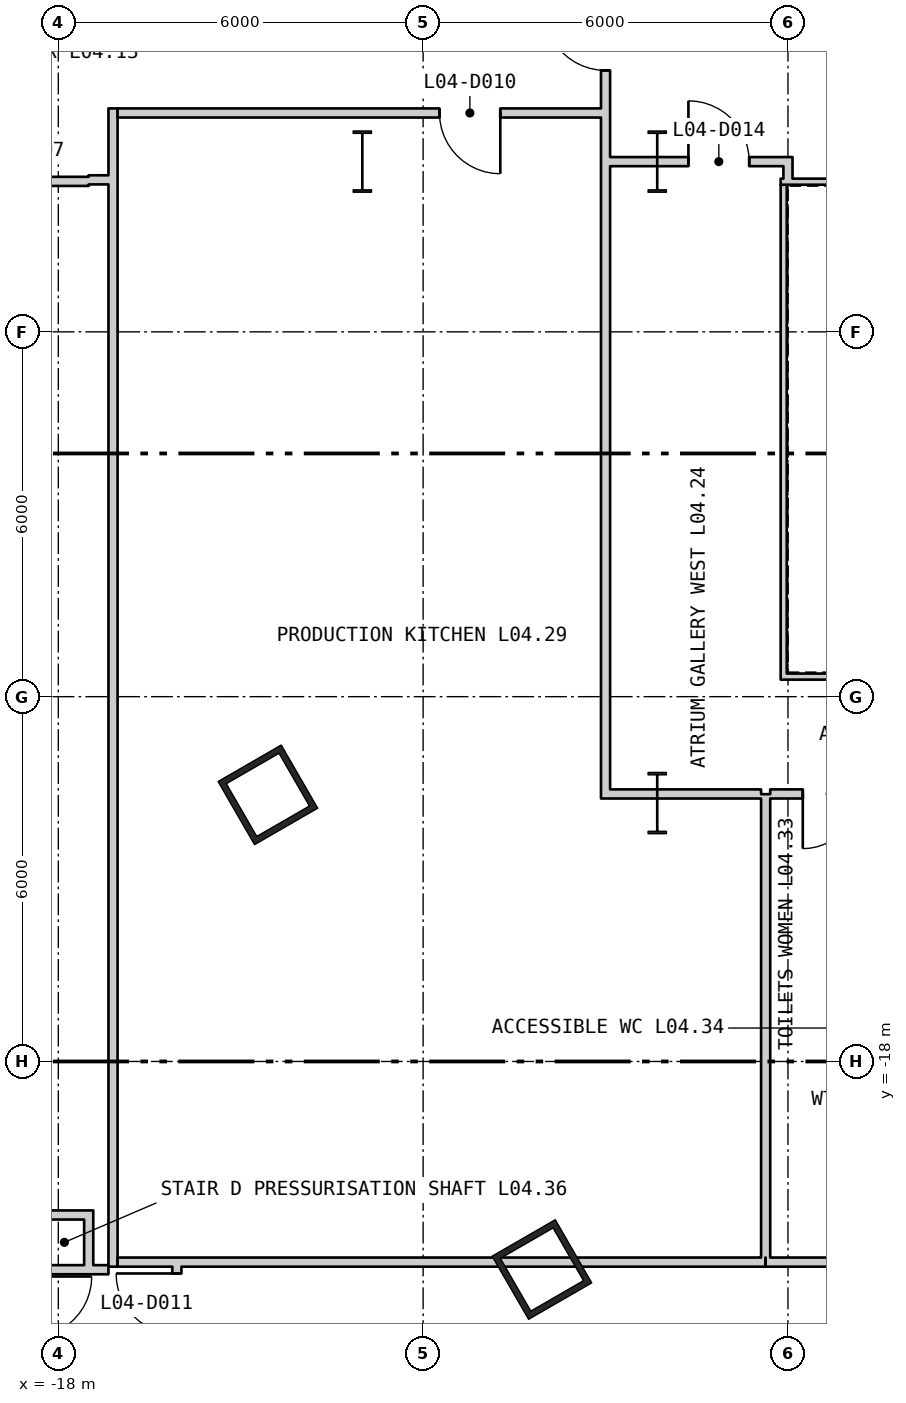
"""IFC4 building model, lengths in metres.
Left out: names, types, materials, properties, quantities, classifications, styles, units other than length and angle.
Written with IfcOpenShell. Run it as: python <this file> out.ifc"""

import sys

from ifc_helpers import new_model, si_unit, direction, frame, frame_2d, origin, origin_2d, place, context, subcontext, project, spatial, rectangle, hollow_rectangle, i_section, extrude, element, fill, save


model = new_model("IFC4")
c1 = context("Model", 3, precision=1e-05, world=origin(), true_north=direction((0.0, 1.0)))
c2 = subcontext(c1, "Body", "Model", "MODEL_VIEW")
j1 = project(units=[si_unit("LENGTHUNIT", "METRE"), si_unit("PLANEANGLEUNIT", "RADIAN")], contexts=[c1])
p1 = place(None, origin())
s1 = spatial("IfcSite", under=j1, at=p1, CompositionType="ELEMENT")
p2 = place(p1, origin())
s2 = spatial("IfcBuilding", under=s1, at=p2, CompositionType="ELEMENT")
p3 = place(p2, frame((0.0, 0.0, 23.7)))
s3 = spatial("IfcBuildingStorey", under=s2, at=p3, CompositionType="ELEMENT", Elevation=23.7)
for number, where, z_axis, x_axis in (
    (1, (-14.553, -13.615, 0.0), (0.0, 0.0, 1.0), (0.5, -0.866, 0.0)),
    (2, (-10.046, -21.422, 0.0), (0.0, 0.0, 1.0), (0.5, -0.866, 0.0)),
):
    element("IfcColumn", number, at=place(p3, frame(where, z_axis=z_axis, x_axis=x_axis)), inside=s3, PredefinedType="COLUMN", context=c2, shape_type="SweptSolid", body=[
        extrude(hollow_rectangle(XDim=1.2, YDim=1.2, WallThickness=0.1, at=origin_2d()), origin(), (0.0, 0.0, 1.0), 5.1),
    ])
for number, where, z_axis, x_axis in (
    (3, (-8.15, -3.2, 0.0), (0.0, 0.0, 1.0), (1.0, 0.0, 0.0)),
    (4, (-8.15, -13.75, 0.0), (0.0, 0.0, 1.0), (1.0, 0.0, 0.0)),
    (5, (-13.0, -3.2, 0.0), (0.0, 0.0, 1.0), (1.0, 0.0, 0.0)),
):
    element("IfcColumn", number, at=place(p3, frame(where, z_axis=z_axis, x_axis=x_axis)), inside=s3, PredefinedType="COLUMN", context=c2, shape_type="SweptSolid", body=[
        extrude(i_section(OverallWidth=0.302, OverallDepth=1.008, WebThickness=0.021, FlangeThickness=0.04, at=origin_2d()), origin(), (0.0, 0.0, 1.0), 5.1),
    ])
for number, where, z_axis, x_axis in (
    (6, (-6.12, -11.67, 0.0), (0.0, 0.0, 1.0), (1.0, 0.0, 0.0)),
    (7, (6.12, -3.53, 0.0), (0.0, 0.0, 1.0), (-1.0, 0.0, 0.0)),
):
    element("IfcWall", number, at=place(p3, frame(where, z_axis=z_axis, x_axis=x_axis)), inside=s3, PredefinedType="PARTITIONING", context=c2, shape_type="SweptSolid", body=[
        extrude(rectangle(XDim=12.24, YDim=0.1, at=frame_2d((6.12, 0.0))), origin(), (0.0, 0.0, 1.0), 4.85),
    ])
p4 = place(p3, frame((-6.07, -3.58, 0.0), z_axis=(0.0, 0.0, 1.0), x_axis=(0.0, -1.0, 0.0)))
e8 = element("IfcWall", 8, at=p4, inside=s3, PredefinedType="PARTITIONING", context=c2, shape_type="SweptSolid", body=[
    extrude(rectangle(XDim=8.04, YDim=0.1, at=frame_2d((4.02, 0.0))), origin(), (0.0, 0.0, 1.0), 4.85),
])
p5 = place(p3, frame((-19.825, -3.525, 0.0), z_axis=(0.0, 0.0, 1.0), x_axis=(1.0, 0.0, 0.0)))
e9 = element("IfcWall", 9, at=p5, inside=s3, PredefinedType="PARTITIONING", context=c2, shape_type="SweptSolid", body=[
    extrude(rectangle(XDim=2.325, YDim=0.15, at=frame_2d((1.163, 0.0))), origin(), (0.0, 0.0, 1.0), 4.85),
])
p6 = place(p5, frame((0.662, 0.0, 0.0)))
e10 = element("IfcOpeningElement", 10, at=p6, cuts=e9, PredefinedType="OPENING", context=c2, shape_type="SweptSolid", body=[
    extrude(rectangle(XDim=1.0, YDim=2.1, at=frame_2d((0.5, 1.05))), frame((0.0, 0.085, 0.0), z_axis=(0.0, -1.0, 0.0), x_axis=(1.0, 0.0, 0.0)), (0.0, 0.0, 1.0), 0.17),
])
for number, where, z_axis, x_axis in (
    (11, (-18.225, -21.425, 0.0), (0.0, 0.0, 1.0), (1.0, 0.0, 0.0)),
    (12, (-18.225, -20.525, 0.0), (0.0, 0.0, 1.0), (1.0, 0.0, 0.0)),
):
    element("IfcWall", number, at=place(p3, frame(where, z_axis=z_axis, x_axis=x_axis)), inside=s3, PredefinedType="PARTITIONING", context=c2, shape_type="SweptSolid", body=[
        extrude(rectangle(XDim=0.65, YDim=0.15, at=frame_2d((0.325, 0.0))), origin(), (0.0, 0.0, 1.0), 4.85),
    ])
p7 = place(p3, frame((-17.5, -21.5, 0.0), z_axis=(0.0, 0.0, 1.0), x_axis=(0.0, 1.0, 0.0)))
e13 = element("IfcWall", 13, at=p7, inside=s3, PredefinedType="PARTITIONING", context=c2, shape_type="SweptSolid", body=[
    extrude(rectangle(XDim=1.05, YDim=0.15, at=frame_2d((0.525, 0.0))), origin(), (0.0, 0.0, 1.0), 4.85),
])
p8 = place(p3, frame((-17.5, -3.5, 0.0), z_axis=(0.0, 0.0, 1.0), x_axis=(1.0, 0.0, 0.0)))
e14 = element("IfcWall", 14, at=p8, inside=s3, PredefinedType="PARTITIONING", context=c2, shape_type="SweptSolid", body=[
    extrude(rectangle(XDim=0.325, YDim=0.15, at=frame_2d((0.163, 0.0))), origin(), (0.0, 0.0, 1.0), 4.85),
])
p9 = place(p3, frame((-17.425, -21.425, 0.0), z_axis=(0.0, 0.0, 1.0), x_axis=(1.0, 0.0, 0.0)))
e15 = element("IfcWall", 15, at=p9, inside=s3, PredefinedType="PARTITIONING", context=c2, shape_type="SweptSolid", body=[
    extrude(rectangle(XDim=0.25, YDim=0.15, at=frame_2d((0.125, 0.0))), origin(), (0.0, 0.0, 1.0), 4.85),
])
p10 = place(p3, frame((-17.1, -21.375, 0.0), z_axis=(0.0, 0.0, 1.0), x_axis=(0.0, 1.0, 0.0)))
e16 = element("IfcWall", 16, at=p10, inside=s3, PredefinedType="PARTITIONING", context=c2, shape_type="SweptSolid", body=[
    extrude(rectangle(XDim=19.05, YDim=0.15, at=frame_2d((9.525, 0.0))), origin(), (0.0, 0.0, 1.0), 4.85),
])
p11 = place(p3, frame((-17.025, -21.3, 0.0), z_axis=(0.0, 0.0, 1.0), x_axis=(1.0, 0.0, 0.0)))
e17 = element("IfcWall", 17, at=p11, inside=s3, PredefinedType="PARTITIONING", context=c2, shape_type="SweptSolid", body=[
    extrude(rectangle(XDim=10.654, YDim=0.15, at=frame_2d((5.327, 0.0))), origin(), (0.0, 0.0, 1.0), 4.85),
])
p12 = place(p3, frame((-17.025, -2.4, 0.0), z_axis=(0.0, 0.0, 1.0), x_axis=(1.0, 0.0, 0.0)))
e18 = element("IfcWall", 18, at=p12, inside=s3, PredefinedType="PARTITIONING", context=c2, shape_type="SweptSolid", body=[
    extrude(rectangle(XDim=7.95, YDim=0.15, at=frame_2d((3.975, 0.0))), origin(), (0.0, 0.0, 1.0), 4.85),
])
p13 = place(p12, frame((5.294, 0.0, 0.0)))
e19 = element("IfcOpeningElement", 19, at=p13, cuts=e18, PredefinedType="OPENING", context=c2, shape_type="SweptSolid", body=[
    extrude(rectangle(XDim=1.0, YDim=2.1, at=frame_2d((0.5, 1.05))), frame((0.0, 0.085, 0.0), z_axis=(0.0, -1.0, 0.0), x_axis=(1.0, 0.0, 0.0)), (0.0, 0.0, 1.0), 0.17),
])
p14 = place(p3, frame((-16.05, -23.55, 0.0), z_axis=(0.0, 0.0, 1.0), x_axis=(0.0, 1.0, 0.0)))
e20 = element("IfcWall", 20, at=p14, inside=s3, PredefinedType="PARTITIONING", context=c2, shape_type="SweptSolid", body=[
    extrude(rectangle(XDim=2.175, YDim=0.15, at=frame_2d((1.087, 0.0))), origin(), (0.0, 0.0, 1.0), 4.16),
])
p15 = place(p14, frame((1.063, 0.0, 0.0)))
e21 = element("IfcOpeningElement", 21, at=p15, cuts=e20, PredefinedType="OPENING", context=c2, shape_type="SweptSolid", body=[
    extrude(rectangle(XDim=1.0, YDim=2.1, at=frame_2d((0.5, 1.05))), frame((0.0, 0.085, 0.0), z_axis=(0.0, -1.0, 0.0), x_axis=(1.0, 0.0, 0.0)), (0.0, 0.0, 1.0), 0.17),
])
p16 = place(p3, frame((-9.0, -13.675, 0.0), z_axis=(0.0, 0.0, 1.0), x_axis=(0.0, 1.0, 0.0)))
e22 = element("IfcWall", 22, at=p16, inside=s3, PredefinedType="PARTITIONING", context=c2, shape_type="SweptSolid", body=[
    extrude(rectangle(XDim=13.675, YDim=0.15, at=frame_2d((6.838, 0.0))), origin(), (0.0, 0.0, 1.0), 4.85),
])
p17 = place(p16, frame((11.975, 0.0, 0.0)))
e23 = element("IfcOpeningElement", 23, at=p17, cuts=e22, PredefinedType="OPENING", context=c2, shape_type="SweptSolid", body=[
    extrude(rectangle(XDim=1.0, YDim=2.1, at=frame_2d((0.5, 1.05))), frame((0.0, 0.085, 0.0), z_axis=(0.0, -1.0, 0.0), x_axis=(1.0, 0.0, 0.0)), (0.0, 0.0, 1.0), 0.17),
])
p18 = place(p3, frame((-8.925, -13.6, 0.0), z_axis=(0.0, 0.0, 1.0), x_axis=(1.0, 0.0, 0.0)))
e24 = element("IfcWall", 24, at=p18, inside=s3, PredefinedType="PARTITIONING", context=c2, shape_type="SweptSolid", body=[
    extrude(rectangle(XDim=0.775, YDim=0.15, at=frame_2d((0.388, 0.0))), origin(), (0.0, 0.0, 1.0), 3.842),
])
p19 = place(p3, frame((-8.15, -13.6, 0.0), z_axis=(0.0, 0.0, 1.0), x_axis=(1.0, 0.0, 0.0)))
e25 = element("IfcWall", 25, at=p19, inside=s3, PredefinedType="PARTITIONING", context=c2, shape_type="SweptSolid", body=[
    extrude(rectangle(XDim=1.708, YDim=0.15, at=frame_2d((0.854, 0.0))), origin(), (0.0, 0.0, 1.0), 3.94),
])
p20 = place(p3, frame((-8.925, -3.2, 0.0), z_axis=(0.0, 0.0, 1.0), x_axis=(1.0, 0.0, 0.0)))
e26 = element("IfcWall", 26, at=p20, inside=s3, PredefinedType="PARTITIONING", context=c2, shape_type="SweptSolid", body=[
    extrude(rectangle(XDim=0.775, YDim=0.15, at=frame_2d((0.388, 0.0))), origin(), (0.0, 0.0, 1.0), 4.16),
])
p21 = place(p3, frame((-8.15, -3.2, 0.0), z_axis=(0.0, 0.0, 1.0), x_axis=(1.0, 0.0, 0.0)))
e27 = element("IfcWall", 27, at=p21, inside=s3, PredefinedType="PARTITIONING", context=c2, shape_type="SweptSolid", body=[
    extrude(rectangle(XDim=2.225, YDim=0.15, at=frame_2d((1.113, 0.0))), origin(), (0.0, 0.0, 1.0), 3.94),
])
p22 = place(p21, frame((0.513, 0.0, 0.0)))
e28 = element("IfcOpeningElement", 28, at=p22, cuts=e27, PredefinedType="OPENING", context=c2, shape_type="SweptSolid", body=[
    extrude(rectangle(XDim=1.0, YDim=2.1, at=frame_2d((0.5, 1.05))), frame((0.0, 0.085, 0.0), z_axis=(0.0, -1.0, 0.0), x_axis=(1.0, 0.0, 0.0)), (0.0, 0.0, 1.0), 0.17),
])
p23 = place(p3, frame((-6.367, -21.3, 0.0), z_axis=(0.0, 0.0, 1.0), x_axis=(1.0, 0.0, 0.0)))
e29 = element("IfcWall", 29, at=p23, inside=s3, PredefinedType="PARTITIONING", context=c2, shape_type="SweptSolid", body=[
    extrude(rectangle(XDim=4.667, YDim=0.15, at=frame_2d((2.333, 0.0))), origin(), (0.0, 0.0, 1.0), 4.85),
])
p24 = place(p3, frame((-6.367, -21.225, 0.0), z_axis=(0.0, 0.0, 1.0), x_axis=(0.0, 1.0, 0.0)))
e30 = element("IfcWall", 30, at=p24, inside=s3, PredefinedType="PARTITIONING", context=c2, shape_type="SweptSolid", body=[
    extrude(rectangle(XDim=7.621, YDim=0.15, at=frame_2d((3.811, 0.0))), origin(), (0.0, 0.0, 1.0), 4.25),
])
p25 = place(p3, frame((-6.292, -13.6, 0.0), z_axis=(0.0, 0.0, 1.0), x_axis=(1.0, 0.0, 0.0)))
e31 = element("IfcWall", 31, at=p25, inside=s3, PredefinedType="PARTITIONING", context=c2, shape_type="SweptSolid", body=[
    extrude(rectangle(XDim=4.592, YDim=0.15, at=frame_2d((2.296, 0.0))), origin(), (0.0, 0.0, 1.0), 3.94),
])
p26 = place(p25, frame((0.536, 0.0, 0.0)))
e32 = element("IfcOpeningElement", 32, at=p26, cuts=e31, PredefinedType="OPENING", context=c2, shape_type="SweptSolid", body=[
    extrude(rectangle(XDim=0.9, YDim=2.1, at=frame_2d((0.45, 1.05))), frame((0.0, 0.085, 0.0), z_axis=(0.0, -1.0, 0.0), x_axis=(1.0, 0.0, 0.0)), (0.0, 0.0, 1.0), 0.17),
])
p27 = place(p25, frame((1.854, 0.0, 0.0)))
e33 = element("IfcOpeningElement", 33, at=p27, cuts=e31, PredefinedType="OPENING", context=c2, shape_type="SweptSolid", body=[
    extrude(rectangle(XDim=0.9, YDim=2.1, at=frame_2d((0.45, 1.05))), frame((0.0, 0.085, 0.0), z_axis=(0.0, -1.0, 0.0), x_axis=(1.0, 0.0, 0.0)), (0.0, 0.0, 1.0), 0.17),
])
p28 = place(p25, frame((3.392, 0.0, 0.0)))
e34 = element("IfcOpeningElement", 34, at=p28, cuts=e31, PredefinedType="OPENING", context=c2, shape_type="SweptSolid", body=[
    extrude(rectangle(XDim=1.0, YDim=2.1, at=frame_2d((0.5, 1.05))), frame((0.0, 0.085, 0.0), z_axis=(0.0, -1.0, 0.0), x_axis=(1.0, 0.0, 0.0)), (0.0, 0.0, 1.0), 0.17),
])
p29 = place(p3, frame((-6.0, -3.48, 0.0), z_axis=(0.0, 0.0, 1.0), x_axis=(0.0, 1.0, 0.0)))
e35 = element("IfcWall", 35, at=p29, inside=s3, PredefinedType="PARTITIONING", context=c2, shape_type="SweptSolid", body=[
    extrude(rectangle(XDim=0.205, YDim=0.15, at=frame_2d((0.102, 0.0))), origin(), (0.0, 0.0, 1.0), 4.85),
])
p30 = place(p13, origin())
e36 = element("IfcDoor", 36, at=p30, inside=s3, OperationType="SINGLE_SWING_RIGHT", PredefinedType="DOOR", context=c2, shape_type="SweptSolid", body=[
    extrude(rectangle(XDim=1.0, YDim=2.1, at=frame_2d((0.5, 1.05))), frame((0.0, 0.025, 0.0), z_axis=(0.0, -1.0, 0.0), x_axis=(1.0, 0.0, 0.0)), (0.0, 0.0, 1.0), 0.05),
])
fill(e19, e36)
p31 = place(p15, origin())
e37 = element("IfcDoor", 37, at=p31, inside=s3, OperationType="SINGLE_SWING_LEFT", PredefinedType="DOOR", context=c2, shape_type="SweptSolid", body=[
    extrude(rectangle(XDim=1.0, YDim=2.1, at=frame_2d((0.5, 1.05))), frame((0.0, 0.025, 0.0), z_axis=(0.0, -1.0, 0.0), x_axis=(1.0, 0.0, 0.0)), (0.0, 0.0, 1.0), 0.05),
])
fill(e21, e37)
p32 = place(p17, origin())
e38 = element("IfcDoor", 38, at=p32, inside=s3, OperationType="SINGLE_SWING_LEFT", PredefinedType="DOOR", context=c2, shape_type="SweptSolid", body=[
    extrude(rectangle(XDim=1.0, YDim=2.1, at=frame_2d((0.5, 1.05))), frame((0.0, 0.025, 0.0), z_axis=(0.0, -1.0, 0.0), x_axis=(1.0, 0.0, 0.0)), (0.0, 0.0, 1.0), 0.05),
])
fill(e23, e38)
p33 = place(p22, origin())
e39 = element("IfcDoor", 39, at=p33, inside=s3, OperationType="SINGLE_SWING_RIGHT", PredefinedType="DOOR", context=c2, shape_type="SweptSolid", body=[
    extrude(rectangle(XDim=1.0, YDim=2.1, at=frame_2d((0.5, 1.05))), frame((0.0, 0.025, 0.0), z_axis=(0.0, -1.0, 0.0), x_axis=(1.0, 0.0, 0.0)), (0.0, 0.0, 1.0), 0.05),
])
fill(e28, e39)
p34 = place(p26, origin())
e40 = element("IfcDoor", 40, at=p34, inside=s3, OperationType="SINGLE_SWING_LEFT", PredefinedType="DOOR", context=c2, shape_type="SweptSolid", body=[
    extrude(rectangle(XDim=0.9, YDim=2.1, at=frame_2d((0.45, 1.05))), frame((0.0, 0.025, 0.0), z_axis=(0.0, -1.0, 0.0), x_axis=(1.0, 0.0, 0.0)), (0.0, 0.0, 1.0), 0.05),
])
fill(e32, e40)
save(model, sys.argv[1])
